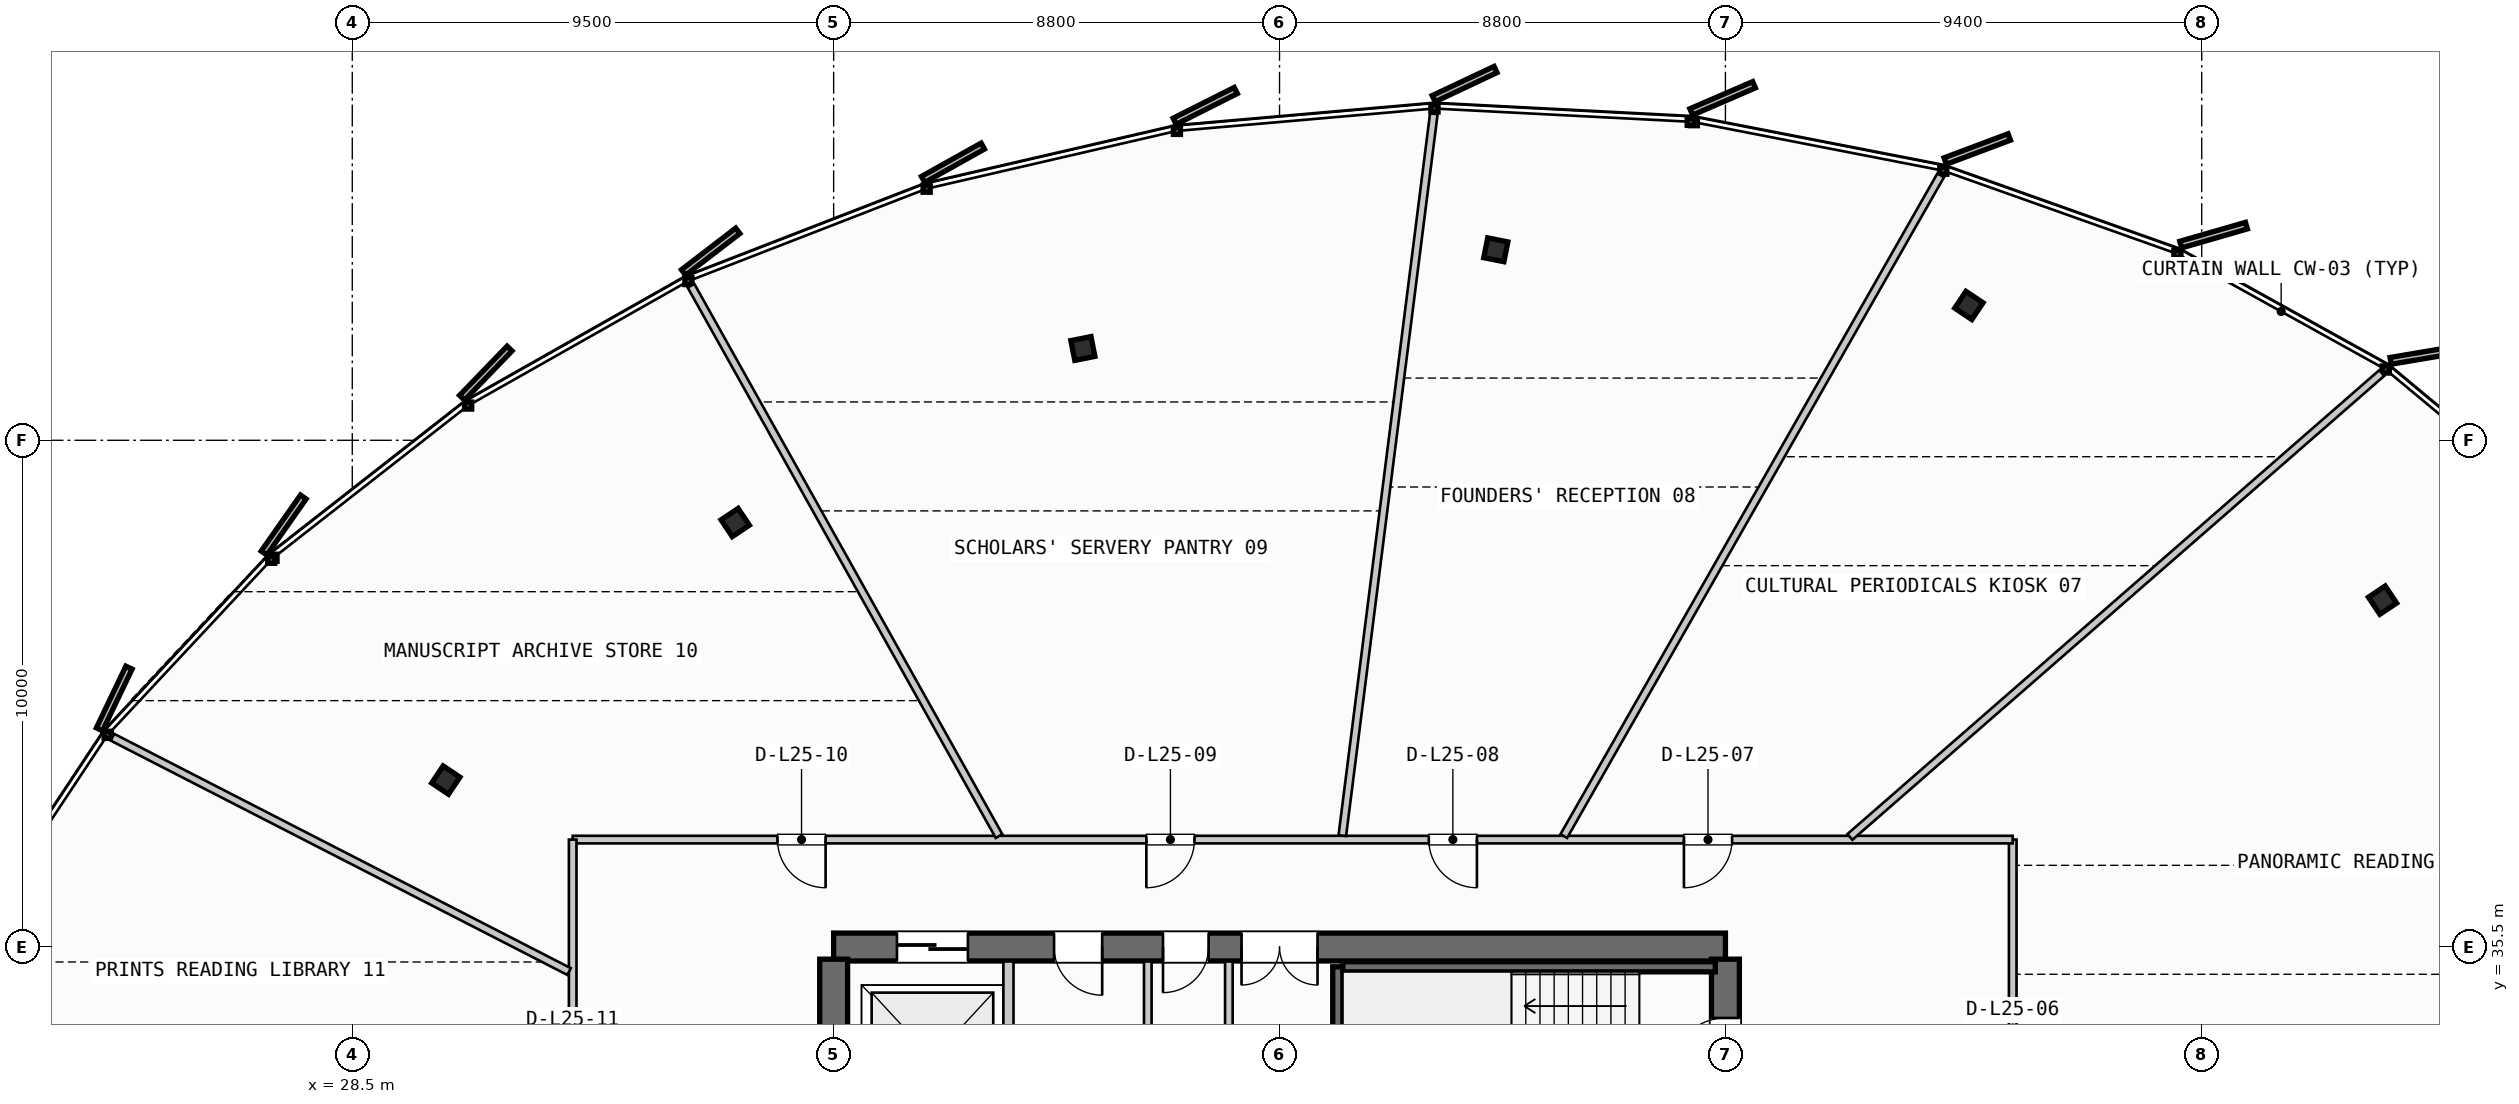
"""IFC4 building model, lengths in metres.
Left out: names, types, materials, properties, quantities, classifications, styles, units other than length and angle.
Written with IfcOpenShell. Run it as: python <this file> out.ifc"""

import sys

from ifc_helpers import new_model, si_unit, direction, frame, frame_2d, origin, origin_2d, place, context, subcontext, project, spatial, rectangle, i_section, extrude, source, transform, mapped, element, fill, save


model = new_model("IFC4")
c1 = context("Model", 3, precision=1e-05, world=origin(), true_north=direction((0.0, 1.0)))
c2 = subcontext(c1, "Body", "Model", "MODEL_VIEW")
j1 = project(units=[si_unit("LENGTHUNIT", "METRE"), si_unit("PLANEANGLEUNIT", "RADIAN")], contexts=[c1])
p1 = place(None, origin())
s1 = spatial("IfcSite", under=j1, at=p1, CompositionType="ELEMENT")
p2 = place(p1, origin())
s2 = spatial("IfcBuilding", under=s1, at=p2, CompositionType="ELEMENT")
p3 = place(p2, frame((0.0, 0.0, 103.6)))
s3 = spatial("IfcBuildingStorey", under=s2, at=p3, CompositionType="ELEMENT", Elevation=103.6)
p4 = place(p3, frame((55.6, 35.5, 0.0), z_axis=(0.0, 0.0, 1.0), x_axis=(-1.0, 0.0, 0.0)))
e1 = element("IfcWall", 1, at=p4, inside=s3, PredefinedType="SHEAR", context=c2, shape_type="SweptSolid", body=[
    extrude(rectangle(XDim=17.6, YDim=0.55, at=frame_2d((8.8, 0.0))), origin(), (0.0, 0.0, 1.0), 3.35),
])
p5 = place(p4, frame((8.05, 0.0, 0.0)))
e2 = element("IfcOpeningElement", 2, at=p5, cuts=e1, PredefinedType="OPENING", context=c2, shape_type="SweptSolid", body=[
    extrude(rectangle(XDim=1.5, YDim=2.2, at=frame_2d((0.75, 1.1))), frame((0.0, 0.285, 0.0), z_axis=(0.0, -1.0, 0.0), x_axis=(1.0, 0.0, 0.0)), (0.0, 0.0, 1.0), 0.57),
])
p6 = place(p4, frame((14.95, 0.0, 0.0)))
e3 = element("IfcOpeningElement", 3, at=p6, cuts=e1, PredefinedType="OPENING", context=c2, shape_type="SweptSolid", body=[
    extrude(rectangle(XDim=1.4, YDim=2.3, at=frame_2d((0.7, 1.15))), frame((0.0, 0.285, 0.0), z_axis=(0.0, -1.0, 0.0), x_axis=(1.0, 0.0, 0.0)), (0.0, 0.0, 1.0), 0.57),
])
p7 = place(p4, frame((12.3, 0.0, 0.0)))
e4 = element("IfcOpeningElement", 4, at=p7, cuts=e1, PredefinedType="OPENING", context=c2, shape_type="SweptSolid", body=[
    extrude(rectangle(XDim=0.95, YDim=2.15, at=frame_2d((0.475, 1.075))), frame((0.0, 0.285, 0.0), z_axis=(0.0, -1.0, 0.0), x_axis=(1.0, 0.0, 0.0)), (0.0, 0.0, 1.0), 0.57),
])
p8 = place(p4, frame((10.2, 0.0, 0.0)))
e5 = element("IfcOpeningElement", 5, at=p8, cuts=e1, PredefinedType="OPENING", context=c2, shape_type="SweptSolid", body=[
    extrude(rectangle(XDim=0.9, YDim=2.15, at=frame_2d((0.45, 1.075))), frame((0.0, 0.285, 0.0), z_axis=(0.0, -1.0, 0.0), x_axis=(1.0, 0.0, 0.0)), (0.0, 0.0, 1.0), 0.57),
])
p9 = place(p3, frame((38.0, 35.26, 0.0), z_axis=(0.0, 0.0, 1.0), x_axis=(0.0, -1.0, 0.0)))
e6 = element("IfcWall", 6, at=p9, inside=s3, PredefinedType="SHEAR", context=c2, shape_type="SweptSolid", body=[
    extrude(rectangle(XDim=14.92, YDim=0.55, at=frame_2d((7.46, 0.0))), origin(), (0.0, 0.0, 1.0), 3.35),
])
p10 = place(p9, frame((5.21, 0.0, 0.0)))
e7 = element("IfcOpeningElement", 7, at=p10, cuts=e6, PredefinedType="OPENING", context=c2, shape_type="SweptSolid", body=[
    extrude(rectangle(XDim=1.1, YDim=2.2, at=frame_2d((0.55, 1.1))), frame((0.0, 0.285, 0.0), z_axis=(0.0, -1.0, 0.0), x_axis=(1.0, 0.0, 0.0)), (0.0, 0.0, 1.0), 0.57),
])
p11 = place(p3, frame((55.6, 20.34, 0.0), z_axis=(0.0, 0.0, 1.0), x_axis=(0.0, 1.0, 0.0)))
e8 = element("IfcWall", 8, at=p11, inside=s3, PredefinedType="SHEAR", context=c2, shape_type="SweptSolid", body=[
    extrude(rectangle(XDim=14.92, YDim=0.55, at=frame_2d((7.46, 0.0))), origin(), (0.0, 0.0, 1.0), 3.35),
])
p12 = place(p11, frame((12.71, 0.0, 0.0)))
e9 = element("IfcOpeningElement", 9, at=p12, cuts=e8, PredefinedType="OPENING", context=c2, shape_type="SweptSolid", body=[
    extrude(rectangle(XDim=1.05, YDim=2.15, at=frame_2d((0.525, 1.075))), frame((0.0, 0.285, 0.0), z_axis=(0.0, -1.0, 0.0), x_axis=(1.0, 0.0, 0.0)), (0.0, 0.0, 1.0), 0.57),
])
p13 = place(p11, frame((8.61, 0.0, 0.0)))
e10 = element("IfcOpeningElement", 10, at=p13, cuts=e8, PredefinedType="OPENING", context=c2, shape_type="SweptSolid", body=[
    extrude(rectangle(XDim=1.1, YDim=2.2, at=frame_2d((0.55, 1.1))), frame((0.0, 0.285, 0.0), z_axis=(0.0, -1.0, 0.0), x_axis=(1.0, 0.0, 0.0)), (0.0, 0.0, 1.0), 0.57),
])
m1 = source(origin(), c2, "Body", "SweptSolid", [
    extrude(i_section(OverallWidth=0.405, OverallDepth=0.398, WebThickness=0.035, FlangeThickness=0.056, FilletRadius=0.015, at=origin_2d()), origin(), (0.0, 0.0, 1.0), 3.35),
])
for number, where, z_axis, x_axis in (
    (11, (68.569, 42.345, 0.0), (0.0, 0.0, 1.0), (0.831, 0.556, 0.0)),
    (12, (60.405, 48.161, 0.0), (0.0, 0.0, 1.0), (0.556, 0.831, 0.0)),
    (13, (51.069, 49.259, 0.0), (0.0, 0.0, 1.0), (0.195, 0.981, 0.0)),
    (14, (42.919, 47.311, 0.0), (0.0, 0.0, 1.0), (-0.195, 0.981, 0.0)),
    (15, (36.058, 43.877, 0.0), (0.0, 0.0, 1.0), (-0.556, 0.831, 0.0)),
    (16, (30.346, 38.794, 0.0), (0.0, 0.0, 1.0), (-0.831, 0.556, 0.0)),
):
    element("IfcColumn", number, at=place(p3, frame(where, z_axis=z_axis, x_axis=x_axis)), inside=s3, PredefinedType="COLUMN", context=c2, shape_type="MappedRepresentation", body=[
        mapped(m1, transform((0.0, 0.0, 0.0), scale=1.0)),
    ])
p14 = place(p3, frame((47.95, 32.05, 0.0), z_axis=(0.0, 0.0, 1.0), x_axis=(0.0, 1.0, 0.0)))
e17 = element("IfcWall", 17, at=p14, inside=s3, PredefinedType="SHEAR", context=c2, shape_type="SweptSolid", body=[
    extrude(rectangle(XDim=3.06, YDim=0.2, at=frame_2d((1.53, 0.0))), origin(), (0.0, 0.0, 1.0), 3.35),
])
p15 = place(p3, frame((48.05, 35.11, 0.0), z_axis=(0.0, 0.0, 1.0), x_axis=(1.0, 0.0, 0.0)))
e18 = element("IfcWall", 18, at=p15, inside=s3, PredefinedType="SHEAR", context=c2, shape_type="SweptSolid", body=[
    extrude(rectangle(XDim=7.35, YDim=0.2, at=frame_2d((3.675, 0.0))), origin(), (0.0, 0.0, 1.0), 3.35),
])
p16 = place(p3, frame((41.45, 31.85, 0.0), z_axis=(0.0, 0.0, 1.0), x_axis=(0.0, 1.0, 0.0)))
e19 = element("IfcWall", 19, at=p16, inside=s3, PredefinedType="PARTITIONING", context=c2, shape_type="SweptSolid", body=[
    extrude(rectangle(XDim=3.365, YDim=0.2, at=frame_2d((1.683, 0.0))), origin(), (0.0, 0.0, 1.0), 2.28),
])
p17 = place(p3, frame((45.8, 31.85, 0.0), z_axis=(0.0, 0.0, 1.0), x_axis=(0.0, 1.0, 0.0)))
e20 = element("IfcWall", 20, at=p17, inside=s3, PredefinedType="PARTITIONING", context=c2, shape_type="SweptSolid", body=[
    extrude(rectangle(XDim=3.365, YDim=0.15, at=frame_2d((1.683, 0.0))), origin(), (0.0, 0.0, 1.0), 2.28),
])
p18 = place(p3, frame((44.2, 31.85, 0.0), z_axis=(0.0, 0.0, 1.0), x_axis=(0.0, 1.0, 0.0)))
e21 = element("IfcWall", 21, at=p18, inside=s3, PredefinedType="PLUMBINGWALL", context=c2, shape_type="SweptSolid", body=[
    extrude(rectangle(XDim=3.365, YDim=0.15, at=frame_2d((1.683, 0.0))), origin(), (0.0, 0.0, 1.0), 2.28),
])
p19 = place(p3, frame((61.27, 17.14, 0.0), z_axis=(0.0, 0.0, 1.0), x_axis=(0.0, 1.0, 0.0)))
e22 = element("IfcWall", 22, at=p19, inside=s3, PredefinedType="PARTITIONING", context=c2, shape_type="SweptSolid", body=[
    extrude(rectangle(XDim=20.48, YDim=0.15, at=frame_2d((10.24, 0.0))), origin(), (0.0, 0.0, 1.0), 2.28),
])
p20 = place(p19, frame((4.498, 0.0, 0.0)))
e23 = element("IfcOpeningElement", 23, at=p20, cuts=e22, PredefinedType="OPENING", context=c2, shape_type="SweptSolid", body=[
    extrude(rectangle(XDim=0.95, YDim=2.15, at=frame_2d((0.475, 1.075))), frame((0.0, 0.085, 0.0), z_axis=(0.0, -1.0, 0.0), x_axis=(1.0, 0.0, 0.0)), (0.0, 0.0, 1.0), 0.17),
])
p21 = place(p19, frame((8.253, 0.0, 0.0)))
e24 = element("IfcOpeningElement", 24, at=p21, cuts=e22, PredefinedType="OPENING", context=c2, shape_type="SweptSolid", body=[
    extrude(rectangle(XDim=0.95, YDim=2.15, at=frame_2d((0.475, 1.075))), frame((0.0, 0.085, 0.0), z_axis=(0.0, -1.0, 0.0), x_axis=(1.0, 0.0, 0.0)), (0.0, 0.0, 1.0), 0.17),
])
p22 = place(p19, frame((14.984, 0.0, 0.0)))
e25 = element("IfcOpeningElement", 25, at=p22, cuts=e22, PredefinedType="OPENING", context=c2, shape_type="SweptSolid", body=[
    extrude(rectangle(XDim=0.95, YDim=2.15, at=frame_2d((0.475, 1.075))), frame((0.0, 0.085, 0.0), z_axis=(0.0, -1.0, 0.0), x_axis=(1.0, 0.0, 0.0)), (0.0, 0.0, 1.0), 0.17),
])
p23 = place(p3, frame((61.27, 37.62, 0.0), z_axis=(0.0, 0.0, 1.0), x_axis=(-1.0, 0.0, 0.0)))
e26 = element("IfcWall", 26, at=p23, inside=s3, PredefinedType="PARTITIONING", context=c2, shape_type="SweptSolid", body=[
    extrude(rectangle(XDim=28.42, YDim=0.15, at=frame_2d((14.21, 0.0))), origin(), (0.0, 0.0, 1.0), 2.28),
])
p24 = place(p23, frame((5.539, 0.0, 0.0)))
e27 = element("IfcOpeningElement", 27, at=p24, cuts=e26, PredefinedType="OPENING", context=c2, shape_type="SweptSolid", body=[
    extrude(rectangle(XDim=0.95, YDim=2.15, at=frame_2d((0.475, 1.075))), frame((0.0, 0.085, 0.0), z_axis=(0.0, -1.0, 0.0), x_axis=(1.0, 0.0, 0.0)), (0.0, 0.0, 1.0), 0.17),
])
p25 = place(p23, frame((10.574, 0.0, 0.0)))
e28 = element("IfcOpeningElement", 28, at=p25, cuts=e26, PredefinedType="OPENING", context=c2, shape_type="SweptSolid", body=[
    extrude(rectangle(XDim=0.95, YDim=2.15, at=frame_2d((0.475, 1.075))), frame((0.0, 0.085, 0.0), z_axis=(0.0, -1.0, 0.0), x_axis=(1.0, 0.0, 0.0)), (0.0, 0.0, 1.0), 0.17),
])
p26 = place(p23, frame((16.148, 0.0, 0.0)))
e29 = element("IfcOpeningElement", 29, at=p26, cuts=e26, PredefinedType="OPENING", context=c2, shape_type="SweptSolid", body=[
    extrude(rectangle(XDim=0.95, YDim=2.15, at=frame_2d((0.475, 1.075))), frame((0.0, 0.085, 0.0), z_axis=(0.0, -1.0, 0.0), x_axis=(1.0, 0.0, 0.0)), (0.0, 0.0, 1.0), 0.17),
])
p27 = place(p23, frame((23.429, 0.0, 0.0)))
e30 = element("IfcOpeningElement", 30, at=p27, cuts=e26, PredefinedType="OPENING", context=c2, shape_type="SweptSolid", body=[
    extrude(rectangle(XDim=0.95, YDim=2.15, at=frame_2d((0.475, 1.075))), frame((0.0, 0.085, 0.0), z_axis=(0.0, -1.0, 0.0), x_axis=(1.0, 0.0, 0.0)), (0.0, 0.0, 1.0), 0.17),
])
p28 = place(p3, frame((32.85, 37.62, 0.0), z_axis=(0.0, 0.0, 1.0), x_axis=(0.0, -1.0, 0.0)))
e31 = element("IfcWall", 31, at=p28, inside=s3, PredefinedType="PARTITIONING", context=c2, shape_type="SweptSolid", body=[
    extrude(rectangle(XDim=20.48, YDim=0.15, at=frame_2d((10.24, 0.0))), origin(), (0.0, 0.0, 1.0), 2.28),
])
p29 = place(p28, frame((4.729, 0.0, 0.0)))
e32 = element("IfcOpeningElement", 32, at=p29, cuts=e31, PredefinedType="OPENING", context=c2, shape_type="SweptSolid", body=[
    extrude(rectangle(XDim=0.95, YDim=2.15, at=frame_2d((0.475, 1.075))), frame((0.0, 0.085, 0.0), z_axis=(0.0, -1.0, 0.0), x_axis=(1.0, 0.0, 0.0)), (0.0, 0.0, 1.0), 0.17),
])
p30 = place(p28, frame((13.375, 0.0, 0.0)))
e33 = element("IfcOpeningElement", 33, at=p30, cuts=e31, PredefinedType="OPENING", context=c2, shape_type="SweptSolid", body=[
    extrude(rectangle(XDim=0.95, YDim=2.15, at=frame_2d((0.475, 1.075))), frame((0.0, 0.085, 0.0), z_axis=(0.0, -1.0, 0.0), x_axis=(1.0, 0.0, 0.0)), (0.0, 0.0, 1.0), 0.17),
])
p31 = place(p3, frame((58.057, 37.673, 0.0), z_axis=(0.0, 0.0, 1.0), x_axis=(0.753623554102, 0.657306274656, 0.0)))
e34 = element("IfcWall", 34, at=p31, inside=s3, PredefinedType="PARTITIONING", context=c2, shape_type="SweptSolid", body=[
    extrude(rectangle(XDim=13.928, YDim=0.15, at=frame_2d((6.964, 0.0))), origin(), (0.0, 0.0, 1.0), 2.28),
])
p32 = place(p3, frame((52.41, 37.689, 0.0), z_axis=(0.0, 0.0, 1.0), x_axis=(0.495503023784, 0.868606213091, 0.0)))
e35 = element("IfcWall", 35, at=p32, inside=s3, PredefinedType="PARTITIONING", context=c2, shape_type="SweptSolid", body=[
    extrude(rectangle(XDim=15.011, YDim=0.15, at=frame_2d((7.506, 0.0))), origin(), (0.0, 0.0, 1.0), 2.28),
])
p33 = place(p3, frame((48.039, 37.699, 0.0), z_axis=(0.0, 0.0, 1.0), x_axis=(0.125809182471, 0.992054458992, 0.0)))
e36 = element("IfcWall", 36, at=p33, inside=s3, PredefinedType="PARTITIONING", context=c2, shape_type="SweptSolid", body=[
    extrude(rectangle(XDim=14.358, YDim=0.15, at=frame_2d((7.179, 0.0))), origin(), (0.0, 0.0, 1.0), 2.28),
])
p34 = place(p3, frame((41.264, 37.69, 0.0), z_axis=(0.0, 0.0, 1.0), x_axis=(-0.488413419201, 0.872612360642, 0.0)))
e37 = element("IfcWall", 37, at=p34, inside=s3, PredefinedType="PARTITIONING", context=c2, shape_type="SweptSolid", body=[
    extrude(rectangle(XDim=12.447, YDim=0.15, at=frame_2d((6.223, 0.0))), origin(), (0.0, 0.0, 1.0), 2.28),
])
p35 = place(p3, frame((32.779, 35.016, 0.0), z_axis=(0.0, 0.0, 1.0), x_axis=(-0.889722087062, 0.456502582461, 0.0)))
e38 = element("IfcWall", 38, at=p35, inside=s3, PredefinedType="PARTITIONING", context=c2, shape_type="SweptSolid", body=[
    extrude(rectangle(XDim=10.129, YDim=0.15, at=frame_2d((5.064, 0.0))), origin(), (0.0, 0.0, 1.0), 2.28),
])
m2 = source(origin(), c2, "Body", "SweptSolid", [
    extrude(rectangle(XDim=1.05, YDim=2.15, at=frame_2d((0.525, 1.075))), frame((0.0, 0.025, 0.0), z_axis=(0.0, -1.0, 0.0), x_axis=(1.0, 0.0, 0.0)), (0.0, 0.0, 1.0), 0.05),
])
p36 = place(p12, origin())
e39 = element("IfcDoor", 39, at=p36, inside=s3, OperationType="SINGLE_SWING_LEFT", PredefinedType="DOOR", context=c2, shape_type="MappedRepresentation", body=[
    mapped(m2, transform((0.0, 0.0, 0.0), scale=1.0)),
])
fill(e9, e39)
m3 = source(origin(), c2, "Body", "SweptSolid", [
    extrude(rectangle(XDim=1.5, YDim=2.2, at=frame_2d((0.75, 1.1))), frame((0.0, 0.025, 0.0), z_axis=(0.0, -1.0, 0.0), x_axis=(1.0, 0.0, 0.0)), (0.0, 0.0, 1.0), 0.05),
])
p37 = place(p5, origin())
e40 = element("IfcDoor", 40, at=p37, inside=s3, OperationType="DOUBLE_DOOR_SINGLE_SWING", PredefinedType="DOOR", context=c2, shape_type="MappedRepresentation", body=[
    mapped(m3, transform((0.0, 0.0, 0.0), scale=1.0)),
])
fill(e2, e40)
m4 = source(origin(), c2, "Body", "SweptSolid", [
    extrude(rectangle(XDim=1.4, YDim=2.3, at=frame_2d((0.7, 1.15))), frame((0.0, 0.025, 0.0), z_axis=(0.0, -1.0, 0.0), x_axis=(1.0, 0.0, 0.0)), (0.0, 0.0, 1.0), 0.05),
])
p38 = place(p6, origin())
e41 = element("IfcDoor", 41, at=p38, inside=s3, OperationType="SLIDING_TO_RIGHT", PredefinedType="DOOR", context=c2, shape_type="MappedRepresentation", body=[
    mapped(m4, transform((0.0, 0.0, 0.0), scale=1.0)),
])
fill(e3, e41)
m5 = source(origin(), c2, "Body", "SweptSolid", [
    extrude(rectangle(XDim=0.95, YDim=2.15, at=frame_2d((0.475, 1.075))), frame((0.0, 0.025, 0.0), z_axis=(0.0, -1.0, 0.0), x_axis=(1.0, 0.0, 0.0)), (0.0, 0.0, 1.0), 0.05),
])
p39 = place(p7, origin())
e42 = element("IfcDoor", 42, at=p39, inside=s3, OperationType="SINGLE_SWING_LEFT", PredefinedType="DOOR", context=c2, shape_type="MappedRepresentation", body=[
    mapped(m5, transform((0.0, 0.0, 0.0), scale=1.0)),
])
fill(e4, e42)
m6 = source(origin(), c2, "Body", "SweptSolid", [
    extrude(rectangle(XDim=0.9, YDim=2.15, at=frame_2d((0.45, 1.075))), frame((0.0, 0.025, 0.0), z_axis=(0.0, -1.0, 0.0), x_axis=(1.0, 0.0, 0.0)), (0.0, 0.0, 1.0), 0.05),
])
p40 = place(p8, origin())
e43 = element("IfcDoor", 43, at=p40, inside=s3, OperationType="SINGLE_SWING_RIGHT", PredefinedType="DOOR", context=c2, shape_type="MappedRepresentation", body=[
    mapped(m6, transform((0.0, 0.0, 0.0), scale=1.0)),
])
fill(e5, e43)
p41 = place(p24, origin())
e44 = element("IfcDoor", 44, at=p41, inside=s3, OperationType="SINGLE_SWING_RIGHT", PredefinedType="DOOR", context=c2, shape_type="MappedRepresentation", body=[
    mapped(m5, transform((0.0, 0.0, 0.0), scale=1.0)),
])
fill(e27, e44)
p42 = place(p25, origin())
e45 = element("IfcDoor", 45, at=p42, inside=s3, OperationType="SINGLE_SWING_LEFT", PredefinedType="DOOR", context=c2, shape_type="MappedRepresentation", body=[
    mapped(m5, transform((0.0, 0.0, 0.0), scale=1.0)),
])
fill(e28, e45)
p43 = place(p26, origin())
e46 = element("IfcDoor", 46, at=p43, inside=s3, OperationType="SINGLE_SWING_RIGHT", PredefinedType="DOOR", context=c2, shape_type="MappedRepresentation", body=[
    mapped(m5, transform((0.0, 0.0, 0.0), scale=1.0)),
])
fill(e29, e46)
p44 = place(p27, origin())
e47 = element("IfcDoor", 47, at=p44, inside=s3, OperationType="SINGLE_SWING_LEFT", PredefinedType="DOOR", context=c2, shape_type="MappedRepresentation", body=[
    mapped(m5, transform((0.0, 0.0, 0.0), scale=1.0)),
])
fill(e30, e47)
save(model, sys.argv[1])
